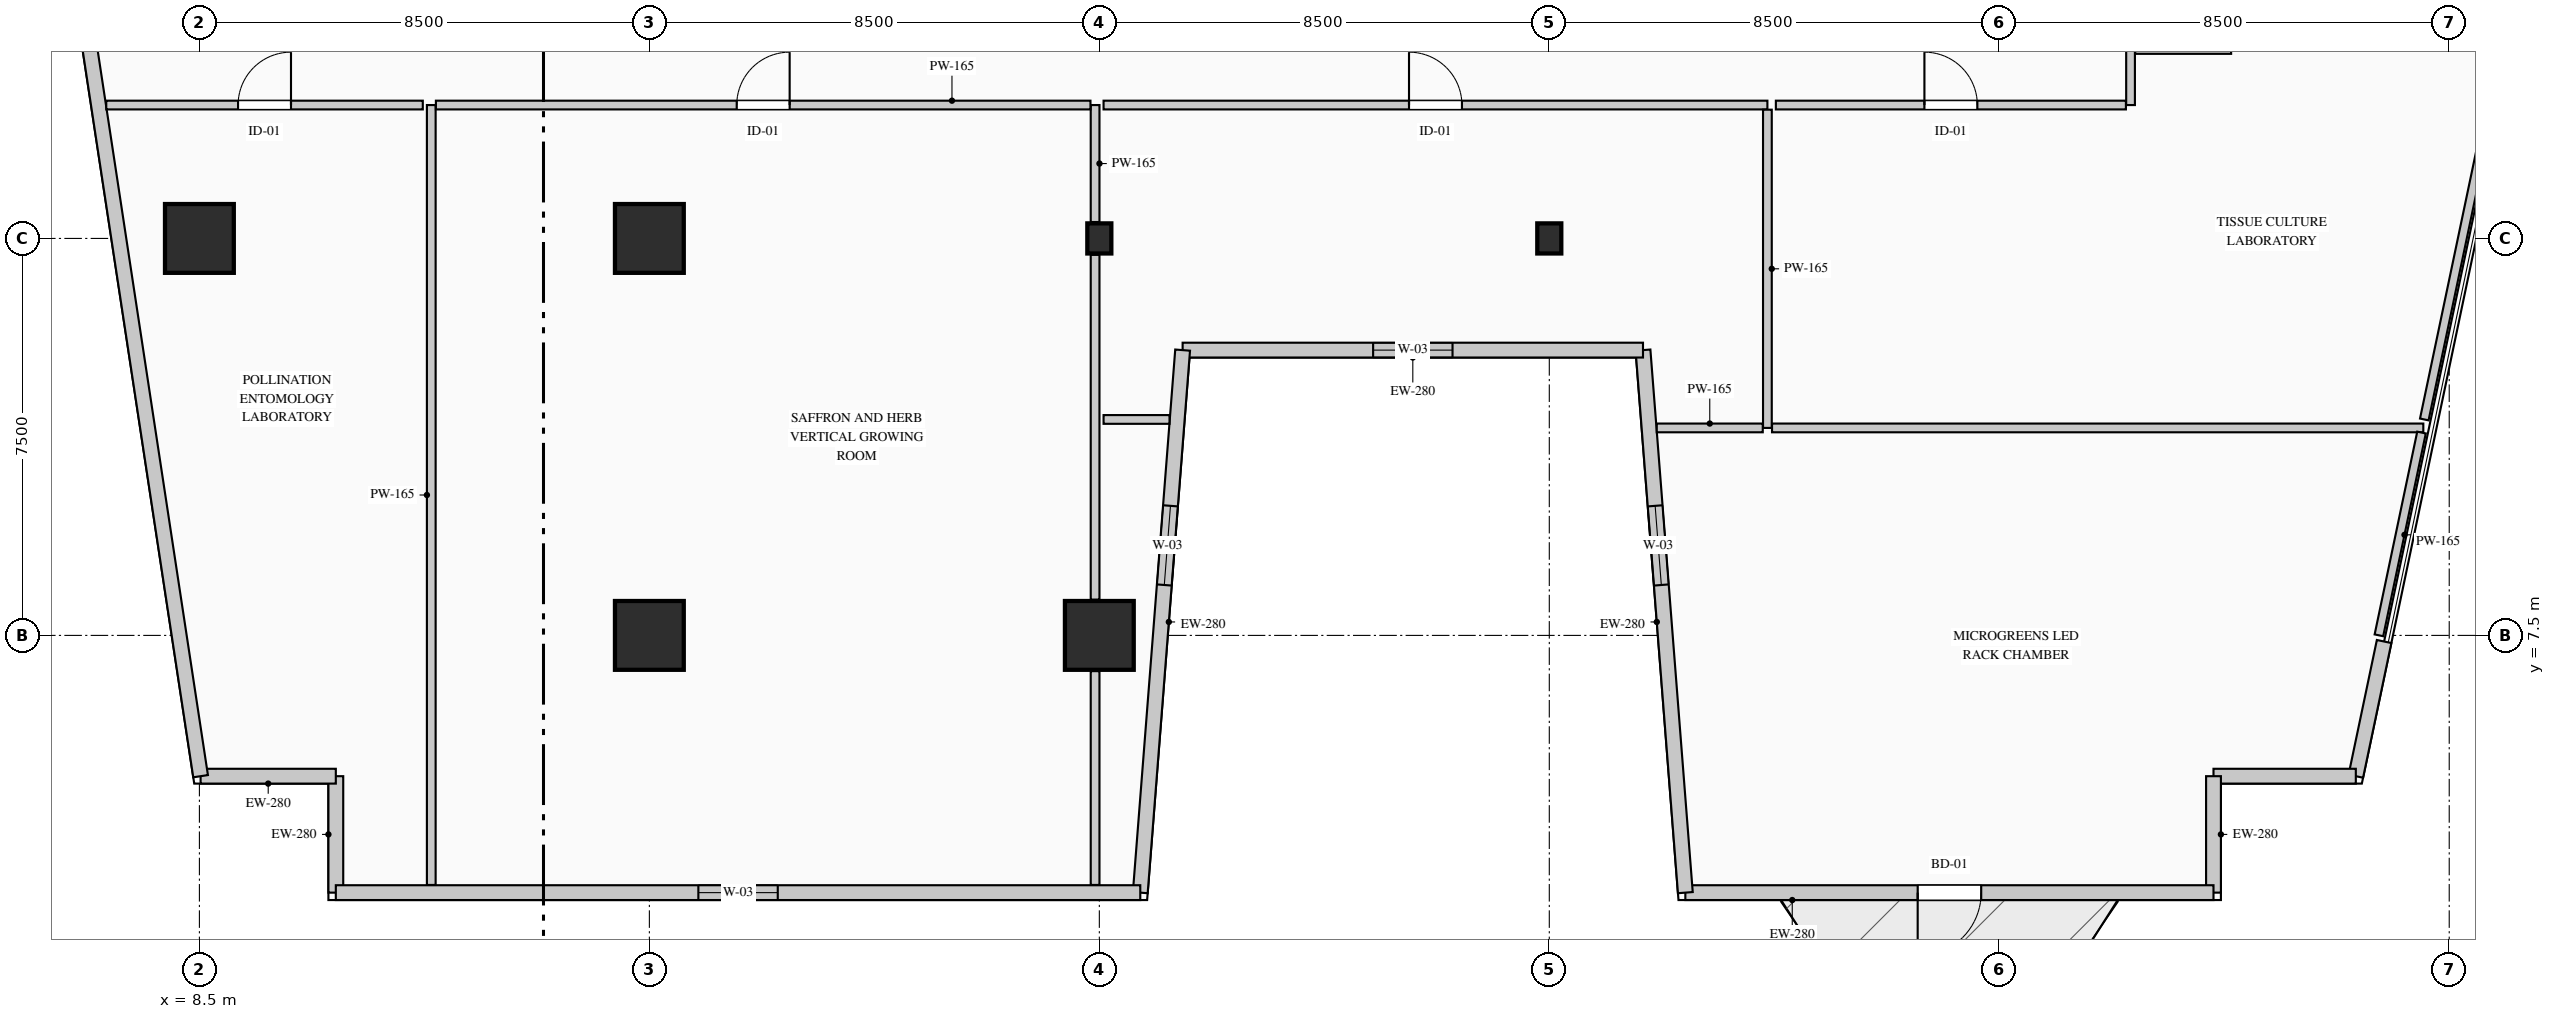
"""IFC4 building model, lengths in metres.
Left out: names, types, materials, properties, quantities, classifications, styles, units other than length and angle.
Written with IfcOpenShell. Run it as: python <this file> out.ifc"""

import sys

from ifc_helpers import new_model, si_unit, direction, frame, frame_2d, origin, origin_2d, place, context, subcontext, project, spatial, rectangle, i_section, extrude, element, fill, save


model = new_model("IFC4")
c1 = context("Model", 3, precision=1e-05, world=origin(), true_north=direction((0.0, 1.0)))
c2 = subcontext(c1, "Body", "Model", "MODEL_VIEW")
j1 = project(units=[si_unit("LENGTHUNIT", "METRE"), si_unit("PLANEANGLEUNIT", "RADIAN")], contexts=[c1])
p1 = place(None, origin())
s1 = spatial("IfcSite", under=j1, at=p1, CompositionType="ELEMENT")
p2 = place(p1, origin())
s2 = spatial("IfcBuilding", under=s1, at=p2, CompositionType="ELEMENT")
p3 = place(p2, frame((0.0, 0.0, 40.2)))
s3 = spatial("IfcBuildingStorey", under=s2, at=p3, CompositionType="ELEMENT", Elevation=40.2)
for number, where, z_axis, x_axis in (
    (1, (8.5, 15.0, 0.0), (0.0, 0.0, 1.0), (1.0, 0.0, 0.0)),
    (2, (17.0, 7.5, 0.0), (0.0, 0.0, 1.0), (1.0, 0.0, 0.0)),
    (3, (17.0, 15.0, 0.0), (0.0, 0.0, 1.0), (1.0, 0.0, 0.0)),
    (4, (25.5, 7.5, 0.0), (0.0, 0.0, 1.0), (1.0, 0.0, 0.0)),
):
    element("IfcColumn", number, at=place(p3, frame(where, z_axis=z_axis, x_axis=x_axis)), inside=s3, PredefinedType="COLUMN", context=c2, shape_type="SweptSolid", body=[
        extrude(rectangle(XDim=1.3, YDim=1.3, at=origin_2d()), origin(), (0.0, 0.0, 1.0), 4.4),
    ])
for number, where, z_axis, x_axis in (
    (5, (25.5, 15.0, 0.0), (0.0, 0.0, 1.0), (1.0, 0.0, 0.0)),
    (6, (34.0, 15.0, 0.0), (0.0, 0.0, 1.0), (1.0, 0.0, 0.0)),
):
    element("IfcColumn", number, at=place(p3, frame(where, z_axis=z_axis, x_axis=x_axis)), inside=s3, PredefinedType="COLUMN", context=c2, shape_type="SweptSolid", body=[
        extrude(i_section(OverallWidth=0.454, OverallDepth=0.569, WebThickness=0.078, FlangeThickness=0.08, FilletRadius=0.015, at=origin_2d()), origin(), (0.0, 0.0, 1.0), 4.4),
    ])
p4 = place(p3, frame((11.077, 2.64, 0.0), z_axis=(0.0, 0.0, 1.0), x_axis=(0.0, 1.0, 0.0)))
e7 = element("IfcWall", 7, at=p4, inside=s3, PredefinedType="STANDARD", context=c2, shape_type="SweptSolid", body=[
    extrude(rectangle(XDim=2.2, YDim=0.28, at=frame_2d((1.1, 0.0))), origin(), (0.0, 0.0, 1.0), 4.1),
])
p5 = place(p3, frame((11.077, 4.84, 0.0), z_axis=(0.0, 0.0, 1.0), x_axis=(-1.0, 0.0, 0.0)))
e8 = element("IfcWall", 8, at=p5, inside=s3, PredefinedType="STANDARD", context=c2, shape_type="SweptSolid", body=[
    extrude(rectangle(XDim=2.554, YDim=0.28, at=frame_2d((1.277, 0.0))), origin(), (0.0, 0.0, 1.0), 4.1),
])
p6 = place(p3, frame((8.523, 4.84, 0.0), z_axis=(0.0, 0.0, 1.0), x_axis=(-0.150394554312, 0.988626055712, 0.0)))
e9 = element("IfcWall", 9, at=p6, inside=s3, PredefinedType="STANDARD", context=c2, shape_type="SweptSolid", body=[
    extrude(rectangle(XDim=36.738, YDim=0.28, at=frame_2d((18.369, 0.0))), origin(), (0.0, 0.0, 1.0), 4.1),
])
p7 = place(p6, frame((22.762, 0.0, 0.9)))
e10 = element("IfcOpeningElement", 10, at=p7, cuts=e9, PredefinedType="OPENING", context=c2, shape_type="SweptSolid", body=[
    extrude(rectangle(XDim=1.5, YDim=1.8, at=frame_2d((0.75, 0.9))), frame((0.0, 0.15, 0.0), z_axis=(0.0, -1.0, 0.0), x_axis=(1.0, 0.0, 0.0)), (0.0, 0.0, 1.0), 0.3),
])
p8 = place(p3, frame((49.77, 7.385, 0.0), z_axis=(0.0, 0.0, 1.0), x_axis=(-0.205551409765, -0.978646319128, 0.0)))
e11 = element("IfcWall", 11, at=p8, inside=s3, PredefinedType="STANDARD", context=c2, shape_type="SweptSolid", body=[
    extrude(rectangle(XDim=2.6, YDim=0.28, at=frame_2d((1.3, 0.0))), origin(), (0.0, 0.0, 1.0), 4.1),
])
p9 = place(p3, frame((49.236, 4.84, 0.0), z_axis=(0.0, 0.0, 1.0), x_axis=(-1.0, 0.0, 0.0)))
e12 = element("IfcWall", 12, at=p9, inside=s3, PredefinedType="STANDARD", context=c2, shape_type="SweptSolid", body=[
    extrude(rectangle(XDim=2.688, YDim=0.28, at=frame_2d((1.344, 0.0))), origin(), (0.0, 0.0, 1.0), 4.1),
])
p10 = place(p3, frame((46.547, 4.84, 0.0), z_axis=(0.0, 0.0, 1.0), x_axis=(0.0, -1.0, 0.0)))
e13 = element("IfcWall", 13, at=p10, inside=s3, PredefinedType="STANDARD", context=c2, shape_type="SweptSolid", body=[
    extrude(rectangle(XDim=2.2, YDim=0.28, at=frame_2d((1.1, 0.0))), origin(), (0.0, 0.0, 1.0), 4.1),
])
p11 = place(p3, frame((46.547, 2.64, 0.0), z_axis=(0.0, 0.0, 1.0), x_axis=(-1.0, 0.0, 0.0)))
e14 = element("IfcWall", 14, at=p11, inside=s3, PredefinedType="STANDARD", context=c2, shape_type="SweptSolid", body=[
    extrude(rectangle(XDim=9.977, YDim=0.28, at=frame_2d((4.989, 0.0))), origin(), (0.0, 0.0, 1.0), 4.1),
])
p12 = place(p11, frame((4.388, 0.0, 0.0)))
e15 = element("IfcOpeningElement", 15, at=p12, cuts=e14, PredefinedType="OPENING", context=c2, shape_type="SweptSolid", body=[
    extrude(rectangle(XDim=1.2, YDim=2.2, at=frame_2d((0.6, 1.1))), frame((0.0, 0.15, 0.0), z_axis=(0.0, -1.0, 0.0), x_axis=(1.0, 0.0, 0.0)), (0.0, 0.0, 1.0), 0.3),
])
p13 = place(p3, frame((36.57, 2.64, 0.0), z_axis=(0.0, 0.0, 1.0), x_axis=(-0.077816860153, 0.996967670627, 0.0)))
e16 = element("IfcWall", 16, at=p13, inside=s3, PredefinedType="STANDARD", context=c2, shape_type="SweptSolid", body=[
    extrude(rectangle(XDim=10.281, YDim=0.28, at=frame_2d((5.141, 0.0))), origin(), (0.0, 0.0, 1.0), 4.1),
])
p14 = place(p13, frame((5.83, 0.0, 0.9)))
e17 = element("IfcOpeningElement", 17, at=p14, cuts=e16, PredefinedType="OPENING", context=c2, shape_type="SweptSolid", body=[
    extrude(rectangle(XDim=1.5, YDim=1.8, at=frame_2d((0.75, 0.9))), frame((0.0, 0.15, 0.0), z_axis=(0.0, -1.0, 0.0), x_axis=(1.0, 0.0, 0.0)), (0.0, 0.0, 1.0), 0.3),
])
p15 = place(p3, frame((35.77, 12.89, 0.0), z_axis=(0.0, 0.0, 1.0), x_axis=(-1.0, 0.0, 0.0)))
e18 = element("IfcWall", 18, at=p15, inside=s3, PredefinedType="STANDARD", context=c2, shape_type="SweptSolid", body=[
    extrude(rectangle(XDim=8.697, YDim=0.28, at=frame_2d((4.348, 0.0))), origin(), (0.0, 0.0, 1.0), 4.1),
])
p16 = place(p15, frame((3.598, 0.0, 0.9)))
e19 = element("IfcOpeningElement", 19, at=p16, cuts=e18, PredefinedType="OPENING", context=c2, shape_type="SweptSolid", body=[
    extrude(rectangle(XDim=1.5, YDim=1.8, at=frame_2d((0.75, 0.9))), frame((0.0, 0.15, 0.0), z_axis=(0.0, -1.0, 0.0), x_axis=(1.0, 0.0, 0.0)), (0.0, 0.0, 1.0), 0.3),
])
p17 = place(p3, frame((27.073, 12.89, 0.0), z_axis=(0.0, 0.0, 1.0), x_axis=(-0.077816860153, -0.996967670627, 0.0)))
e20 = element("IfcWall", 20, at=p17, inside=s3, PredefinedType="STANDARD", context=c2, shape_type="SweptSolid", body=[
    extrude(rectangle(XDim=10.281, YDim=0.28, at=frame_2d((5.141, 0.0))), origin(), (0.0, 0.0, 1.0), 4.1),
])
p18 = place(p17, frame((2.951, 0.0, 0.9)))
e21 = element("IfcOpeningElement", 21, at=p18, cuts=e20, PredefinedType="OPENING", context=c2, shape_type="SweptSolid", body=[
    extrude(rectangle(XDim=1.5, YDim=1.8, at=frame_2d((0.75, 0.9))), frame((0.0, 0.15, 0.0), z_axis=(0.0, -1.0, 0.0), x_axis=(1.0, 0.0, 0.0)), (0.0, 0.0, 1.0), 0.3),
])
p19 = place(p3, frame((26.273, 2.64, 0.0), z_axis=(0.0, 0.0, 1.0), x_axis=(-1.0, 0.0, 0.0)))
e22 = element("IfcWall", 22, at=p19, inside=s3, PredefinedType="STANDARD", context=c2, shape_type="SweptSolid", body=[
    extrude(rectangle(XDim=15.197, YDim=0.28, at=frame_2d((7.598, 0.0))), origin(), (0.0, 0.0, 1.0), 4.1),
])
p20 = place(p19, frame((6.848, 0.0, 0.9)))
e23 = element("IfcOpeningElement", 23, at=p20, cuts=e22, PredefinedType="OPENING", context=c2, shape_type="SweptSolid", body=[
    extrude(rectangle(XDim=1.5, YDim=1.8, at=frame_2d((0.75, 0.9))), frame((0.0, 0.15, 0.0), z_axis=(0.0, -1.0, 0.0), x_axis=(1.0, 0.0, 0.0)), (0.0, 0.0, 1.0), 0.3),
])
p21 = place(p3, frame((25.42, 17.52, 0.0), z_axis=(0.0, 0.0, 1.0), x_axis=(0.0, -1.0, 0.0)))
e24 = element("IfcWall", 24, at=p21, inside=s3, PredefinedType="PARTITIONING", context=c2, shape_type="SweptSolid", body=[
    extrude(rectangle(XDim=2.21, YDim=0.165, at=frame_2d((1.105, 0.0))), origin(), (0.0, 0.0, 1.0), 3.285),
])
p22 = place(p3, frame((25.42, 14.69, 0.0), z_axis=(0.0, 0.0, 1.0), x_axis=(0.0, -1.0, 0.0)))
e25 = element("IfcWall", 25, at=p22, inside=s3, PredefinedType="PARTITIONING", context=c2, shape_type="SweptSolid", body=[
    extrude(rectangle(XDim=6.515, YDim=0.165, at=frame_2d((3.258, 0.0))), origin(), (0.0, 0.0, 1.0), 3.385),
])
p23 = place(p3, frame((25.42, 6.825, 0.0), z_axis=(0.0, 0.0, 1.0), x_axis=(0.0, -1.0, 0.0)))
e26 = element("IfcWall", 26, at=p23, inside=s3, PredefinedType="PARTITIONING", context=c2, shape_type="SweptSolid", body=[
    extrude(rectangle(XDim=4.04, YDim=0.165, at=frame_2d((2.02, 0.0))), origin(), (0.0, 0.0, 1.0), 4.1),
])
p24 = place(p3, frame((12.88, 2.785, 0.0), z_axis=(0.0, 0.0, 1.0), x_axis=(0.0, 1.0, 0.0)))
e27 = element("IfcWall", 27, at=p24, inside=s3, PredefinedType="PARTITIONING", context=c2, shape_type="SweptSolid", body=[
    extrude(rectangle(XDim=14.735, YDim=0.165, at=frame_2d((7.368, 0.0))), origin(), (0.0, 0.0, 1.0), 4.1),
])
p25 = place(p3, frame((12.968, 17.52, 0.0), z_axis=(0.0, 0.0, 1.0), x_axis=(1.0, 0.0, 0.0)))
e28 = element("IfcWall", 28, at=p25, inside=s3, PredefinedType="PARTITIONING", context=c2, shape_type="SweptSolid", body=[
    extrude(rectangle(XDim=12.365, YDim=0.165, at=frame_2d((6.183, 0.0))), origin(), (0.0, 0.0, 1.0), 4.1),
])
p26 = place(p25, frame((5.683, 0.0, 0.0)))
e29 = element("IfcOpeningElement", 29, at=p26, cuts=e28, PredefinedType="OPENING", context=c2, shape_type="SweptSolid", body=[
    extrude(rectangle(XDim=1.0, YDim=2.15, at=frame_2d((0.5, 1.075))), frame((0.0, 0.093, 0.0), z_axis=(0.0, -1.0, 0.0), x_axis=(1.0, 0.0, 0.0)), (0.0, 0.0, 1.0), 0.185),
])
p27 = place(p3, frame((26.826, 11.58, 0.0), z_axis=(0.0, 0.0, 1.0), x_axis=(-1.0, 0.0, 0.0)))
e30 = element("IfcWall", 30, at=p27, inside=s3, PredefinedType="PARTITIONING", context=c2, shape_type="SweptSolid", body=[
    extrude(rectangle(XDim=1.246, YDim=0.165, at=frame_2d((0.623, 0.0))), origin(), (0.0, 0.0, 1.0), 4.1),
])
p28 = place(p3, frame((25.58, 17.52, 0.0), z_axis=(0.0, 0.0, 1.0), x_axis=(1.0, 0.0, 0.0)))
e31 = element("IfcWall", 31, at=p28, inside=s3, PredefinedType="PARTITIONING", context=c2, shape_type="SweptSolid", body=[
    extrude(rectangle(XDim=12.54, YDim=0.165, at=frame_2d((6.27, 0.0))), origin(), (0.0, 0.0, 1.0), 3.785),
])
p29 = place(p28, frame((5.77, 0.0, 0.0)))
e32 = element("IfcOpeningElement", 32, at=p29, cuts=e31, PredefinedType="OPENING", context=c2, shape_type="SweptSolid", body=[
    extrude(rectangle(XDim=1.0, YDim=2.15, at=frame_2d((0.5, 1.075))), frame((0.0, 0.093, 0.0), z_axis=(0.0, -1.0, 0.0), x_axis=(1.0, 0.0, 0.0)), (0.0, 0.0, 1.0), 0.185),
])
p30 = place(p3, frame((38.12, 17.433, 0.0), z_axis=(0.0, 0.0, 1.0), x_axis=(0.0, -1.0, 0.0)))
e33 = element("IfcWall", 33, at=p30, inside=s3, PredefinedType="PARTITIONING", context=c2, shape_type="SweptSolid", body=[
    extrude(rectangle(XDim=6.013, YDim=0.165, at=frame_2d((3.006, 0.0))), origin(), (0.0, 0.0, 1.0), 4.1),
])
p31 = place(p3, frame((36.03, 11.42, 0.0), z_axis=(0.0, 0.0, 1.0), x_axis=(1.0, 0.0, 0.0)))
e34 = element("IfcWall", 34, at=p31, inside=s3, PredefinedType="PARTITIONING", context=c2, shape_type="SweptSolid", body=[
    extrude(rectangle(XDim=2.002, YDim=0.165, at=frame_2d((1.001, 0.0))), origin(), (0.0, 0.0, 1.0), 4.1),
])
p32 = place(p3, frame((38.208, 11.42, 0.0), z_axis=(0.0, 0.0, 1.0), x_axis=(1.0, 0.0, 0.0)))
e35 = element("IfcWall", 35, at=p32, inside=s3, PredefinedType="PARTITIONING", context=c2, shape_type="SweptSolid", body=[
    extrude(rectangle(XDim=12.303, YDim=0.165, at=frame_2d((6.151, 0.0))), origin(), (0.0, 0.0, 1.0), 4.1),
])
p33 = place(p3, frame((50.477, 11.333, 0.0), z_axis=(0.0, 0.0, 1.0), x_axis=(-0.205570398428, -0.978642330624, 0.0)))
e36 = element("IfcWall", 36, at=p33, inside=s3, PredefinedType="PARTITIONING", context=c2, shape_type="SweptSolid", body=[
    extrude(rectangle(XDim=3.914, YDim=0.165, at=frame_2d((1.957, 0.0))), origin(), (0.0, 0.0, 1.0), 4.1),
])
p34 = place(p3, frame((6.74, 17.52, 0.0), z_axis=(0.0, 0.0, 1.0), x_axis=(1.0, 0.0, 0.0)))
e37 = element("IfcWall", 37, at=p34, inside=s3, PredefinedType="PARTITIONING", context=c2, shape_type="SweptSolid", body=[
    extrude(rectangle(XDim=5.979, YDim=0.165, at=frame_2d((2.99, 0.0))), origin(), (0.0, 0.0, 1.0), 4.1),
])
p35 = place(p34, frame((2.49, 0.0, 0.0)))
e38 = element("IfcOpeningElement", 38, at=p35, cuts=e37, PredefinedType="OPENING", context=c2, shape_type="SweptSolid", body=[
    extrude(rectangle(XDim=1.0, YDim=2.15, at=frame_2d((0.5, 1.075))), frame((0.0, 0.093, 0.0), z_axis=(0.0, -1.0, 0.0), x_axis=(1.0, 0.0, 0.0)), (0.0, 0.0, 1.0), 0.185),
])
p36 = place(p3, frame((44.98, 17.52, 0.0), z_axis=(0.0, 0.0, 1.0), x_axis=(0.0, 1.0, 0.0)))
e39 = element("IfcWall", 39, at=p36, inside=s3, PredefinedType="PARTITIONING", context=c2, shape_type="SweptSolid", body=[
    extrude(rectangle(XDim=1.05, YDim=0.165, at=frame_2d((0.525, 0.0))), origin(), (0.0, 0.0, 1.0), 4.1),
])
p37 = place(p3, frame((45.067, 18.57, 0.0), z_axis=(0.0, 0.0, 1.0), x_axis=(1.0, 0.0, 0.0)))
e40 = element("IfcWall", 40, at=p37, inside=s3, PredefinedType="PARTITIONING", context=c2, shape_type="SweptSolid", body=[
    extrude(rectangle(XDim=1.812, YDim=0.165, at=frame_2d((0.906, 0.0))), origin(), (0.0, 0.0, 1.0), 4.1),
])
p38 = place(p3, frame((52.77, 22.248, 0.0), z_axis=(0.0, 0.0, 1.0), x_axis=(-0.205565714744, -0.978643314452, 0.0)))
e41 = element("IfcWall", 41, at=p38, inside=s3, PredefinedType="PARTITIONING", context=c2, shape_type="SweptSolid", body=[
    extrude(rectangle(XDim=10.9, YDim=0.165, at=frame_2d((5.45, 0.0))), origin(), (0.0, 0.0, 1.0), 4.1),
])
p39 = place(p3, frame((38.28, 17.52, 0.0), z_axis=(0.0, 0.0, 1.0), x_axis=(1.0, 0.0, 0.0)))
e42 = element("IfcWall", 42, at=p39, inside=s3, PredefinedType="PARTITIONING", context=c2, shape_type="SweptSolid", body=[
    extrude(rectangle(XDim=6.613, YDim=0.165, at=frame_2d((3.306, 0.0))), origin(), (0.0, 0.0, 1.0), 4.1),
])
p40 = place(p39, frame((2.806, 0.0, 0.0)))
e43 = element("IfcOpeningElement", 43, at=p40, cuts=e42, PredefinedType="OPENING", context=c2, shape_type="SweptSolid", body=[
    extrude(rectangle(XDim=1.0, YDim=2.15, at=frame_2d((0.5, 1.075))), frame((0.0, 0.093, 0.0), z_axis=(0.0, -1.0, 0.0), x_axis=(1.0, 0.0, 0.0)), (0.0, 0.0, 1.0), 0.185),
])
p41 = place(p12, origin())
e44 = element("IfcDoor", 44, at=p41, inside=s3, OperationType="SINGLE_SWING_RIGHT", PredefinedType="DOOR", context=c2, shape_type="SweptSolid", body=[
    extrude(rectangle(XDim=1.2, YDim=2.2, at=frame_2d((0.6, 1.1))), frame((0.0, 0.025, 0.0), z_axis=(0.0, -1.0, 0.0), x_axis=(1.0, 0.0, 0.0)), (0.0, 0.0, 1.0), 0.05),
])
fill(e15, e44)
p42 = place(p14, origin())
e45 = element("IfcWindow", 45, at=p42, inside=s3, PartitioningType="SINGLE_PANEL", PredefinedType="WINDOW", context=c2, shape_type="SweptSolid", body=[
    extrude(rectangle(XDim=1.5, YDim=1.8, at=frame_2d((0.75, 0.9))), frame((0.0, 0.03, 0.0), z_axis=(0.0, -1.0, 0.0), x_axis=(1.0, 0.0, 0.0)), (0.0, 0.0, 1.0), 0.06),
])
fill(e17, e45)
p43 = place(p16, origin())
e46 = element("IfcWindow", 46, at=p43, inside=s3, PartitioningType="SINGLE_PANEL", PredefinedType="WINDOW", context=c2, shape_type="SweptSolid", body=[
    extrude(rectangle(XDim=1.5, YDim=1.8, at=frame_2d((0.75, 0.9))), frame((0.0, 0.03, 0.0), z_axis=(0.0, -1.0, 0.0), x_axis=(1.0, 0.0, 0.0)), (0.0, 0.0, 1.0), 0.06),
])
fill(e19, e46)
p44 = place(p18, origin())
e47 = element("IfcWindow", 47, at=p44, inside=s3, PartitioningType="SINGLE_PANEL", PredefinedType="WINDOW", context=c2, shape_type="SweptSolid", body=[
    extrude(rectangle(XDim=1.5, YDim=1.8, at=frame_2d((0.75, 0.9))), frame((0.0, 0.03, 0.0), z_axis=(0.0, -1.0, 0.0), x_axis=(1.0, 0.0, 0.0)), (0.0, 0.0, 1.0), 0.06),
])
fill(e21, e47)
p45 = place(p20, origin())
e48 = element("IfcWindow", 48, at=p45, inside=s3, PartitioningType="SINGLE_PANEL", PredefinedType="WINDOW", context=c2, shape_type="SweptSolid", body=[
    extrude(rectangle(XDim=1.5, YDim=1.8, at=frame_2d((0.75, 0.9))), frame((0.0, 0.03, 0.0), z_axis=(0.0, -1.0, 0.0), x_axis=(1.0, 0.0, 0.0)), (0.0, 0.0, 1.0), 0.06),
])
fill(e23, e48)
p46 = place(p26, origin())
e49 = element("IfcDoor", 49, at=p46, inside=s3, OperationType="SINGLE_SWING_RIGHT", PredefinedType="DOOR", context=c2, shape_type="SweptSolid", body=[
    extrude(rectangle(XDim=1.0, YDim=2.15, at=frame_2d((0.5, 1.075))), frame((0.0, 0.025, 0.0), z_axis=(0.0, -1.0, 0.0), x_axis=(1.0, 0.0, 0.0)), (0.0, 0.0, 1.0), 0.05),
])
fill(e29, e49)
p47 = place(p29, origin())
e50 = element("IfcDoor", 50, at=p47, inside=s3, OperationType="SINGLE_SWING_LEFT", PredefinedType="DOOR", context=c2, shape_type="SweptSolid", body=[
    extrude(rectangle(XDim=1.0, YDim=2.15, at=frame_2d((0.5, 1.075))), frame((0.0, 0.025, 0.0), z_axis=(0.0, -1.0, 0.0), x_axis=(1.0, 0.0, 0.0)), (0.0, 0.0, 1.0), 0.05),
])
fill(e32, e50)
p48 = place(p35, origin())
e51 = element("IfcDoor", 51, at=p48, inside=s3, OperationType="SINGLE_SWING_RIGHT", PredefinedType="DOOR", context=c2, shape_type="SweptSolid", body=[
    extrude(rectangle(XDim=1.0, YDim=2.15, at=frame_2d((0.5, 1.075))), frame((0.0, 0.025, 0.0), z_axis=(0.0, -1.0, 0.0), x_axis=(1.0, 0.0, 0.0)), (0.0, 0.0, 1.0), 0.05),
])
fill(e38, e51)
p49 = place(p40, origin())
e52 = element("IfcDoor", 52, at=p49, inside=s3, OperationType="SINGLE_SWING_LEFT", PredefinedType="DOOR", context=c2, shape_type="SweptSolid", body=[
    extrude(rectangle(XDim=1.0, YDim=2.15, at=frame_2d((0.5, 1.075))), frame((0.0, 0.025, 0.0), z_axis=(0.0, -1.0, 0.0), x_axis=(1.0, 0.0, 0.0)), (0.0, 0.0, 1.0), 0.05),
])
fill(e43, e52)
save(model, sys.argv[1])
